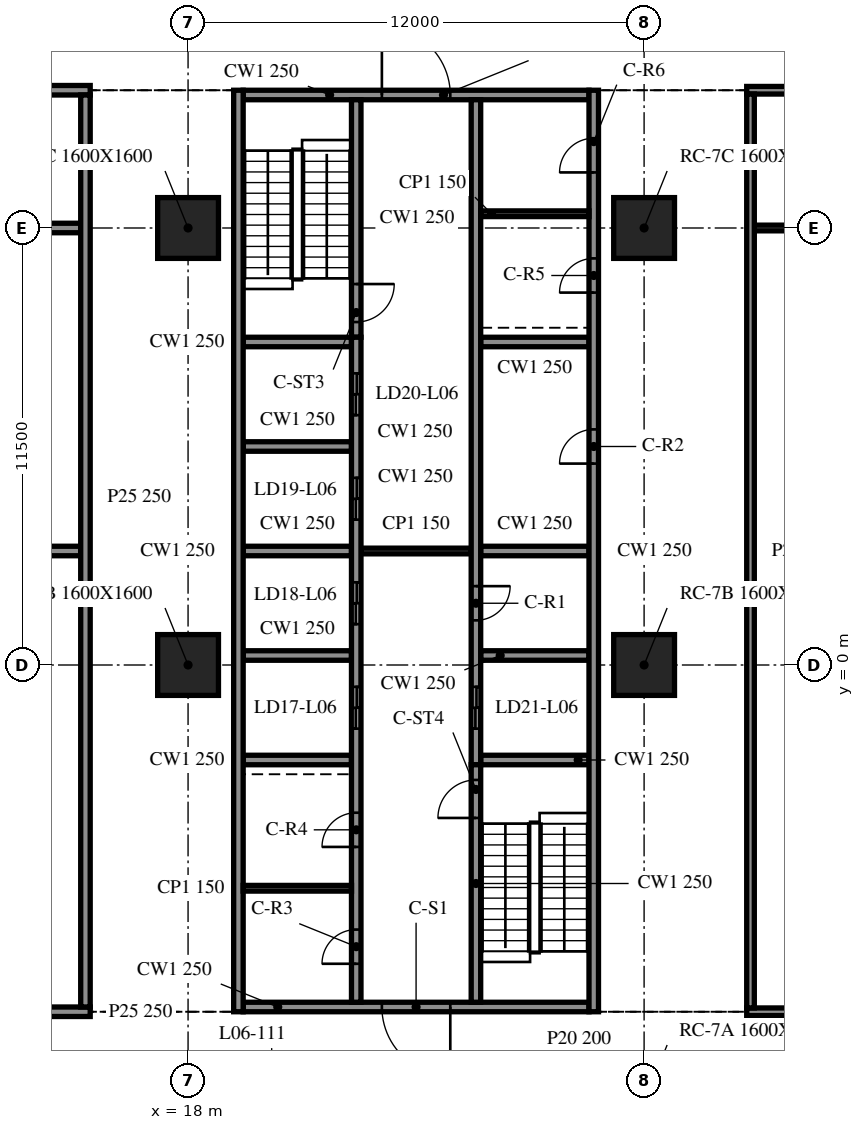
"""IFC4 building model, lengths in metres.
Left out: names, types, materials, properties, quantities, classifications, styles, units other than length and angle.
Written with IfcOpenShell. Run it as: python <this file> out.ifc"""

import sys

from ifc_helpers import new_model, si_unit, direction, frame, frame_2d, origin, origin_2d, place, context, subcontext, project, spatial, rectangle, extrude, element, fill, save


model = new_model("IFC4")
c1 = context("Model", 3, precision=1e-05, world=origin(), true_north=direction((0.0, 1.0)))
c2 = subcontext(c1, "Body", "Model", "MODEL_VIEW")
j1 = project(units=[si_unit("LENGTHUNIT", "METRE"), si_unit("PLANEANGLEUNIT", "RADIAN")], contexts=[c1])
p1 = place(None, origin())
s1 = spatial("IfcSite", under=j1, at=p1, CompositionType="ELEMENT")
p2 = place(p1, origin())
s2 = spatial("IfcBuilding", under=s1, at=p2, CompositionType="ELEMENT")
p3 = place(p2, frame((0.0, 0.0, 28.7)))
s3 = spatial("IfcBuildingStorey", under=s2, at=p3, CompositionType="ELEMENT", Elevation=28.7)
for number, where, z_axis, x_axis in (
    (1, (18.0, 0.0, -0.34), (0.0, 0.0, 1.0), (1.0, 0.0, 0.0)),
    (2, (18.0, 11.5, -0.34), (0.0, 0.0, 1.0), (1.0, 0.0, 0.0)),
    (3, (30.0, 0.0, -0.34), (0.0, 0.0, 1.0), (1.0, 0.0, 0.0)),
    (4, (30.0, 11.5, -0.34), (0.0, 0.0, 1.0), (1.0, 0.0, 0.0)),
):
    element("IfcColumn", number, at=place(p3, frame(where, z_axis=z_axis, x_axis=x_axis)), inside=s3, PredefinedType="COLUMN", context=c2, shape_type="SweptSolid", body=[
        extrude(rectangle(XDim=1.6, YDim=1.6, at=origin_2d()), origin(), (0.0, 0.0, 1.0), 4.3),
    ])
p4 = place(p3, frame((19.325, 15.125, 0.0), z_axis=(0.0, 0.0, 1.0), x_axis=(0.0, -1.0, 0.0)))
e5 = element("IfcWall", 5, at=p4, inside=s3, PredefinedType="SOLIDWALL", context=c2, shape_type="SweptSolid", body=[
    extrude(rectangle(XDim=24.25, YDim=0.25, at=frame_2d((12.125, 0.0))), origin(), (0.0, 0.0, 1.0), 3.96),
])
p5 = place(p3, frame((28.675, -9.125, 0.0), z_axis=(0.0, 0.0, 1.0), x_axis=(0.0, 1.0, 0.0)))
e6 = element("IfcWall", 6, at=p5, inside=s3, PredefinedType="SOLIDWALL", context=c2, shape_type="SweptSolid", body=[
    extrude(rectangle(XDim=24.25, YDim=0.25, at=frame_2d((12.125, 0.0))), origin(), (0.0, 0.0, 1.0), 3.96),
])
p6 = place(p5, frame((14.425, 0.0, 0.0)))
e7 = element("IfcOpeningElement", 7, at=p6, cuts=e6, PredefinedType="OPENING", context=c2, shape_type="SweptSolid", body=[
    extrude(rectangle(XDim=0.9, YDim=2.1, at=frame_2d((0.45, 1.05))), frame((0.0, 0.135, 0.0), z_axis=(0.0, -1.0, 0.0), x_axis=(1.0, 0.0, 0.0)), (0.0, 0.0, 1.0), 0.27),
])
p7 = place(p5, frame((18.925, 0.0, 0.0)))
e8 = element("IfcOpeningElement", 8, at=p7, cuts=e6, PredefinedType="OPENING", context=c2, shape_type="SweptSolid", body=[
    extrude(rectangle(XDim=0.9, YDim=2.1, at=frame_2d((0.45, 1.05))), frame((0.0, 0.135, 0.0), z_axis=(0.0, -1.0, 0.0), x_axis=(1.0, 0.0, 0.0)), (0.0, 0.0, 1.0), 0.27),
])
p8 = place(p5, frame((22.087, 0.0, 0.0)))
e9 = element("IfcOpeningElement", 9, at=p8, cuts=e6, PredefinedType="OPENING", context=c2, shape_type="SweptSolid", body=[
    extrude(rectangle(XDim=0.9, YDim=2.1, at=frame_2d((0.45, 1.05))), frame((0.0, 0.135, 0.0), z_axis=(0.0, -1.0, 0.0), x_axis=(1.0, 0.0, 0.0)), (0.0, 0.0, 1.0), 0.27),
])
p9 = place(p3, frame((28.55, -9.0, 0.0), z_axis=(0.0, 0.0, 1.0), x_axis=(-1.0, 0.0, 0.0)))
e10 = element("IfcWall", 10, at=p9, inside=s3, PredefinedType="SOLIDWALL", context=c2, shape_type="SweptSolid", body=[
    extrude(rectangle(XDim=9.1, YDim=0.25, at=frame_2d((4.55, 0.0))), origin(), (0.0, 0.0, 1.0), 3.96),
])
p10 = place(p9, frame((3.65, 0.0, 0.0)))
e11 = element("IfcOpeningElement", 11, at=p10, cuts=e10, PredefinedType="OPENING", context=c2, shape_type="SweptSolid", body=[
    extrude(rectangle(XDim=1.8, YDim=2.1, at=frame_2d((0.9, 1.05))), frame((0.0, 0.135, 0.0), z_axis=(0.0, -1.0, 0.0), x_axis=(1.0, 0.0, 0.0)), (0.0, 0.0, 1.0), 0.27),
])
p11 = place(p3, frame((19.45, 15.0, 0.0), z_axis=(0.0, 0.0, 1.0), x_axis=(1.0, 0.0, 0.0)))
e12 = element("IfcWall", 12, at=p11, inside=s3, PredefinedType="SOLIDWALL", context=c2, shape_type="SweptSolid", body=[
    extrude(rectangle(XDim=9.1, YDim=0.25, at=frame_2d((4.55, 0.0))), origin(), (0.0, 0.0, 1.0), 3.96),
])
p12 = place(p11, frame((3.65, 0.0, 0.0)))
e13 = element("IfcOpeningElement", 13, at=p12, cuts=e12, PredefinedType="OPENING", context=c2, shape_type="SweptSolid", body=[
    extrude(rectangle(XDim=1.8, YDim=2.1, at=frame_2d((0.9, 1.05))), frame((0.0, 0.135, 0.0), z_axis=(0.0, -1.0, 0.0), x_axis=(1.0, 0.0, 0.0)), (0.0, 0.0, 1.0), 0.27),
])
p13 = place(p3, frame((22.425, -8.875, 0.0), z_axis=(0.0, 0.0, 1.0), x_axis=(0.0, 1.0, 0.0)))
e14 = element("IfcWall", 14, at=p13, inside=s3, PredefinedType="SOLIDWALL", context=c2, shape_type="SweptSolid", body=[
    extrude(rectangle(XDim=17.5, YDim=0.25, at=frame_2d((8.75, 0.0))), origin(), (0.0, 0.0, 1.0), 3.96),
])
p14 = place(p13, frame((7.2, 0.0, 0.0)))
e15 = element("IfcOpeningElement", 15, at=p14, cuts=e14, PredefinedType="OPENING", context=c2, shape_type="SweptSolid", body=[
    extrude(rectangle(XDim=1.1, YDim=2.1, at=frame_2d((0.55, 1.05))), frame((0.0, 0.135, 0.0), z_axis=(0.0, -1.0, 0.0), x_axis=(1.0, 0.0, 0.0)), (0.0, 0.0, 1.0), 0.27),
])
p15 = place(p13, frame((9.95, 0.0, 0.0)))
e16 = element("IfcOpeningElement", 16, at=p15, cuts=e14, PredefinedType="OPENING", context=c2, shape_type="SweptSolid", body=[
    extrude(rectangle(XDim=1.1, YDim=2.1, at=frame_2d((0.55, 1.05))), frame((0.0, 0.135, 0.0), z_axis=(0.0, -1.0, 0.0), x_axis=(1.0, 0.0, 0.0)), (0.0, 0.0, 1.0), 0.27),
])
p16 = place(p13, frame((12.7, 0.0, 0.0)))
e17 = element("IfcOpeningElement", 17, at=p16, cuts=e14, PredefinedType="OPENING", context=c2, shape_type="SweptSolid", body=[
    extrude(rectangle(XDim=1.1, YDim=2.1, at=frame_2d((0.55, 1.05))), frame((0.0, 0.135, 0.0), z_axis=(0.0, -1.0, 0.0), x_axis=(1.0, 0.0, 0.0)), (0.0, 0.0, 1.0), 0.27),
])
p17 = place(p13, frame((15.45, 0.0, 0.0)))
e18 = element("IfcOpeningElement", 18, at=p17, cuts=e14, PredefinedType="OPENING", context=c2, shape_type="SweptSolid", body=[
    extrude(rectangle(XDim=1.1, YDim=2.1, at=frame_2d((0.55, 1.05))), frame((0.0, 0.135, 0.0), z_axis=(0.0, -1.0, 0.0), x_axis=(1.0, 0.0, 0.0)), (0.0, 0.0, 1.0), 0.27),
])
p18 = place(p13, frame((1.012, 0.0, 0.0)))
e19 = element("IfcOpeningElement", 19, at=p18, cuts=e14, PredefinedType="OPENING", context=c2, shape_type="SweptSolid", body=[
    extrude(rectangle(XDim=0.9, YDim=2.1, at=frame_2d((0.45, 1.05))), frame((0.0, 0.135, 0.0), z_axis=(0.0, -1.0, 0.0), x_axis=(1.0, 0.0, 0.0)), (0.0, 0.0, 1.0), 0.27),
])
p19 = place(p13, frame((4.087, 0.0, 0.0)))
e20 = element("IfcOpeningElement", 20, at=p19, cuts=e14, PredefinedType="OPENING", context=c2, shape_type="SweptSolid", body=[
    extrude(rectangle(XDim=0.9, YDim=2.1, at=frame_2d((0.45, 1.05))), frame((0.0, 0.135, 0.0), z_axis=(0.0, -1.0, 0.0), x_axis=(1.0, 0.0, 0.0)), (0.0, 0.0, 1.0), 0.27),
])
p20 = place(p3, frame((22.425, 14.875, 0.0), z_axis=(0.0, 0.0, 1.0), x_axis=(0.0, -1.0, 0.0)))
e21 = element("IfcWall", 21, at=p20, inside=s3, PredefinedType="SOLIDWALL", context=c2, shape_type="SweptSolid", body=[
    extrude(rectangle(XDim=6.25, YDim=0.25, at=frame_2d((3.125, 0.0))), origin(), (0.0, 0.0, 1.0), 3.96),
])
p21 = place(p20, frame((4.85, 0.0, 0.0)))
e22 = element("IfcOpeningElement", 22, at=p21, cuts=e21, PredefinedType="OPENING", context=c2, shape_type="SweptSolid", body=[
    extrude(rectangle(XDim=1.0, YDim=2.1, at=frame_2d((0.5, 1.05))), frame((0.0, 0.135, 0.0), z_axis=(0.0, -1.0, 0.0), x_axis=(1.0, 0.0, 0.0)), (0.0, 0.0, 1.0), 0.27),
])
p22 = place(p3, frame((25.575, -8.875, 0.0), z_axis=(0.0, 0.0, 1.0), x_axis=(0.0, 1.0, 0.0)))
e23 = element("IfcWall", 23, at=p22, inside=s3, PredefinedType="SOLIDWALL", context=c2, shape_type="SweptSolid", body=[
    extrude(rectangle(XDim=6.25, YDim=0.25, at=frame_2d((3.125, 0.0))), origin(), (0.0, 0.0, 1.0), 3.96),
])
p23 = place(p22, frame((4.85, 0.0, 0.0)))
e24 = element("IfcOpeningElement", 24, at=p23, cuts=e23, PredefinedType="OPENING", context=c2, shape_type="SweptSolid", body=[
    extrude(rectangle(XDim=1.0, YDim=2.1, at=frame_2d((0.5, 1.05))), frame((0.0, 0.135, 0.0), z_axis=(0.0, -1.0, 0.0), x_axis=(1.0, 0.0, 0.0)), (0.0, 0.0, 1.0), 0.27),
])
p24 = place(p3, frame((25.575, 14.875, 0.0), z_axis=(0.0, 0.0, 1.0), x_axis=(0.0, -1.0, 0.0)))
e25 = element("IfcWall", 25, at=p24, inside=s3, PredefinedType="SOLIDWALL", context=c2, shape_type="SweptSolid", body=[
    extrude(rectangle(XDim=17.5, YDim=0.25, at=frame_2d((8.75, 0.0))), origin(), (0.0, 0.0, 1.0), 3.96),
])
p25 = place(p24, frame((15.45, 0.0, 0.0)))
e26 = element("IfcOpeningElement", 26, at=p25, cuts=e25, PredefinedType="OPENING", context=c2, shape_type="SweptSolid", body=[
    extrude(rectangle(XDim=1.1, YDim=2.1, at=frame_2d((0.55, 1.05))), frame((0.0, 0.135, 0.0), z_axis=(0.0, -1.0, 0.0), x_axis=(1.0, 0.0, 0.0)), (0.0, 0.0, 1.0), 0.27),
])
p26 = place(p24, frame((12.8, 0.0, 0.0)))
e27 = element("IfcOpeningElement", 27, at=p26, cuts=e25, PredefinedType="OPENING", context=c2, shape_type="SweptSolid", body=[
    extrude(rectangle(XDim=0.9, YDim=2.1, at=frame_2d((0.45, 1.05))), frame((0.0, 0.135, 0.0), z_axis=(0.0, -1.0, 0.0), x_axis=(1.0, 0.0, 0.0)), (0.0, 0.0, 1.0), 0.27),
])
for number, where, z_axis, x_axis in (
    (28, (19.45, -2.5, 0.0), (0.0, 0.0, 1.0), (1.0, 0.0, 0.0)),
    (29, (19.45, 0.25, 0.0), (0.0, 0.0, 1.0), (1.0, 0.0, 0.0)),
    (30, (19.45, 3.0, 0.0), (0.0, 0.0, 1.0), (1.0, 0.0, 0.0)),
    (31, (19.45, 5.75, 0.0), (0.0, 0.0, 1.0), (1.0, 0.0, 0.0)),
    (32, (19.45, 8.5, 0.0), (0.0, 0.0, 1.0), (1.0, 0.0, 0.0)),
    (33, (25.7, -2.5, 0.0), (0.0, 0.0, 1.0), (1.0, 0.0, 0.0)),
    (34, (25.7, 0.25, 0.0), (0.0, 0.0, 1.0), (1.0, 0.0, 0.0)),
    (35, (25.7, 3.0, 0.0), (0.0, 0.0, 1.0), (1.0, 0.0, 0.0)),
    (36, (25.7, 8.5, 0.0), (0.0, 0.0, 1.0), (1.0, 0.0, 0.0)),
):
    element("IfcWall", number, at=place(p3, frame(where, z_axis=z_axis, x_axis=x_axis)), inside=s3, PredefinedType="SOLIDWALL", context=c2, shape_type="SweptSolid", body=[
        extrude(rectangle(XDim=2.85, YDim=0.25, at=frame_2d((1.425, 0.0))), origin(), (0.0, 0.0, 1.0), 3.96),
    ])
p27 = place(p3, frame((22.55, 3.0, 0.0), z_axis=(0.0, 0.0, 1.0), x_axis=(1.0, 0.0, 0.0)))
e37 = element("IfcWall", 37, at=p27, inside=s3, PredefinedType="PARTITIONING", context=c2, shape_type="SweptSolid", body=[
    extrude(rectangle(XDim=2.9, YDim=0.15, at=frame_2d((1.45, 0.0))), origin(), (0.0, 0.0, 1.0), 3.96),
])
for number, where, z_axis, x_axis in (
    (38, (19.45, -5.875, 0.0), (0.0, 0.0, 1.0), (1.0, 0.0, 0.0)),
    (39, (25.7, 11.875, 0.0), (0.0, 0.0, 1.0), (1.0, 0.0, 0.0)),
):
    element("IfcWall", number, at=place(p3, frame(where, z_axis=z_axis, x_axis=x_axis)), inside=s3, PredefinedType="PARTITIONING", context=c2, shape_type="SweptSolid", body=[
        extrude(rectangle(XDim=2.85, YDim=0.15, at=frame_2d((1.425, 0.0))), origin(), (0.0, 0.0, 1.0), 3.96),
    ])
p28 = place(p3, frame((8.475, -9.125, 0.0), z_axis=(0.0, 0.0, 1.0), x_axis=(1.0, 0.0, 0.0)))
e40 = element("IfcWall", 40, at=p28, inside=s3, PredefinedType="PARTITIONING", context=c2, shape_type="SweptSolid", body=[
    extrude(rectangle(XDim=6.95, YDim=0.25, at=frame_2d((3.475, 0.0))), origin(), (0.0, 0.0, 1.0), 3.96),
])
p29 = place(p28, frame((3.1, 0.0, 0.0)))
e41 = element("IfcOpeningElement", 41, at=p29, cuts=e40, PredefinedType="OPENING", context=c2, shape_type="SweptSolid", body=[
    extrude(rectangle(XDim=0.9, YDim=2.1, at=frame_2d((0.45, 1.05))), frame((0.0, 0.135, 0.0), z_axis=(0.0, -1.0, 0.0), x_axis=(1.0, 0.0, 0.0)), (0.0, 0.0, 1.0), 0.27),
])
p30 = place(p3, frame((32.7, -9.125, 0.0), z_axis=(0.0, 0.0, 1.0), x_axis=(1.0, 0.0, 0.0)))
e42 = element("IfcWall", 42, at=p30, inside=s3, PredefinedType="PARTITIONING", context=c2, shape_type="SweptSolid", body=[
    extrude(rectangle(XDim=15.15, YDim=0.2, at=frame_2d((7.575, 0.0))), origin(), (0.0, 0.0, 1.0), 3.96),
])
p31 = place(p30, frame((6.9, 0.0, 0.0)))
e43 = element("IfcOpeningElement", 43, at=p31, cuts=e42, PredefinedType="OPENING", context=c2, shape_type="SweptSolid", body=[
    extrude(rectangle(XDim=1.2, YDim=2.1, at=frame_2d((0.6, 1.05))), frame((0.0, 0.11, 0.0), z_axis=(0.0, -1.0, 0.0), x_axis=(1.0, 0.0, 0.0)), (0.0, 0.0, 1.0), 0.22),
])
for number, where, z_axis, x_axis in (
    (44, (8.725, 3.0, 0.0), (0.0, 0.0, 1.0), (1.0, 0.0, 0.0)),
    (45, (8.725, 11.5, 0.0), (0.0, 0.0, 1.0), (1.0, 0.0, 0.0)),
):
    element("IfcWall", number, at=place(p3, frame(where, z_axis=z_axis, x_axis=x_axis)), inside=s3, PredefinedType="PARTITIONING", context=c2, shape_type="SweptSolid", body=[
        extrude(rectangle(XDim=6.45, YDim=0.25, at=frame_2d((3.225, 0.0))), origin(), (0.0, 0.0, 1.0), 3.96),
    ])
p32 = place(p3, frame((32.9, 11.5, 0.0), z_axis=(0.0, 0.0, 1.0), x_axis=(1.0, 0.0, 0.0)))
e46 = element("IfcWall", 46, at=p32, inside=s3, PredefinedType="PARTITIONING", context=c2, shape_type="SweptSolid", body=[
    extrude(rectangle(XDim=8.3, YDim=0.15, at=frame_2d((4.15, 0.0))), origin(), (0.0, 0.0, 1.0), 3.96),
])
p33 = place(p3, frame((8.475, 15.125, 0.0), z_axis=(0.0, 0.0, 1.0), x_axis=(1.0, 0.0, 0.0)))
e47 = element("IfcWall", 47, at=p33, inside=s3, PredefinedType="PARTITIONING", context=c2, shape_type="SweptSolid", body=[
    extrude(rectangle(XDim=6.95, YDim=0.25, at=frame_2d((3.475, 0.0))), origin(), (0.0, 0.0, 1.0), 3.96),
])
p34 = place(p33, frame((3.1, 0.0, 0.0)))
e48 = element("IfcOpeningElement", 48, at=p34, cuts=e47, PredefinedType="OPENING", context=c2, shape_type="SweptSolid", body=[
    extrude(rectangle(XDim=0.9, YDim=2.1, at=frame_2d((0.45, 1.05))), frame((0.0, 0.135, 0.0), z_axis=(0.0, -1.0, 0.0), x_axis=(1.0, 0.0, 0.0)), (0.0, 0.0, 1.0), 0.27),
])
p35 = place(p3, frame((32.7, 15.125, 0.0), z_axis=(0.0, 0.0, 1.0), x_axis=(1.0, 0.0, 0.0)))
e49 = element("IfcWall", 49, at=p35, inside=s3, PredefinedType="PARTITIONING", context=c2, shape_type="SweptSolid", body=[
    extrude(rectangle(XDim=15.15, YDim=0.2, at=frame_2d((7.575, 0.0))), origin(), (0.0, 0.0, 1.0), 3.96),
])
p36 = place(p35, frame((7.1, 0.0, 0.0)))
e50 = element("IfcOpeningElement", 50, at=p36, cuts=e49, PredefinedType="OPENING", context=c2, shape_type="SweptSolid", body=[
    extrude(rectangle(XDim=1.0, YDim=2.1, at=frame_2d((0.5, 1.05))), frame((0.0, 0.11, 0.0), z_axis=(0.0, -1.0, 0.0), x_axis=(1.0, 0.0, 0.0)), (0.0, 0.0, 1.0), 0.22),
])
p37 = place(p3, frame((15.3, -9.0, 0.0), z_axis=(0.0, 0.0, 1.0), x_axis=(0.0, 1.0, 0.0)))
e51 = element("IfcWall", 51, at=p37, inside=s3, PredefinedType="PARTITIONING", context=c2, shape_type="SweptSolid", body=[
    extrude(rectangle(XDim=24.0, YDim=0.25, at=frame_2d((12.0, 0.0))), origin(), (0.0, 0.0, 1.0), 3.96),
])
p38 = place(p3, frame((32.8, -9.025, 0.0), z_axis=(0.0, 0.0, 1.0), x_axis=(0.0, 1.0, 0.0)))
e52 = element("IfcWall", 52, at=p38, inside=s3, PredefinedType="PARTITIONING", context=c2, shape_type="SweptSolid", body=[
    extrude(rectangle(XDim=24.05, YDim=0.2, at=frame_2d((12.025, 0.0))), origin(), (0.0, 0.0, 1.0), 3.96),
])
p39 = place(p10, origin())
e53 = element("IfcDoor", 53, at=p39, inside=s3, OperationType="DOUBLE_DOOR_SINGLE_SWING", PredefinedType="DOOR", context=c2, shape_type="SweptSolid", body=[
    extrude(rectangle(XDim=1.8, YDim=2.1, at=frame_2d((0.9, 1.05))), frame((0.0, 0.025, 0.0), z_axis=(0.0, -1.0, 0.0), x_axis=(1.0, 0.0, 0.0)), (0.0, 0.0, 1.0), 0.05),
])
fill(e11, e53)
p40 = place(p12, origin())
e54 = element("IfcDoor", 54, at=p40, inside=s3, OperationType="DOUBLE_DOOR_SINGLE_SWING", PredefinedType="DOOR", context=c2, shape_type="SweptSolid", body=[
    extrude(rectangle(XDim=1.8, YDim=2.1, at=frame_2d((0.9, 1.05))), frame((0.0, 0.025, 0.0), z_axis=(0.0, -1.0, 0.0), x_axis=(1.0, 0.0, 0.0)), (0.0, 0.0, 1.0), 0.05),
])
fill(e13, e54)
p41 = place(p25, origin())
e55 = element("IfcDoor", 55, at=p41, inside=s3, OperationType="DOUBLE_DOOR_SLIDING", PredefinedType="DOOR", context=c2, shape_type="SweptSolid", body=[
    extrude(rectangle(XDim=1.1, YDim=2.1, at=frame_2d((0.55, 1.05))), frame((0.0, 0.025, 0.0), z_axis=(0.0, -1.0, 0.0), x_axis=(1.0, 0.0, 0.0)), (0.0, 0.0, 1.0), 0.05),
])
fill(e26, e55)
p42 = place(p14, origin())
e56 = element("IfcDoor", 56, at=p42, inside=s3, OperationType="DOUBLE_DOOR_SLIDING", PredefinedType="DOOR", context=c2, shape_type="SweptSolid", body=[
    extrude(rectangle(XDim=1.1, YDim=2.1, at=frame_2d((0.55, 1.05))), frame((0.0, 0.025, 0.0), z_axis=(0.0, -1.0, 0.0), x_axis=(1.0, 0.0, 0.0)), (0.0, 0.0, 1.0), 0.05),
])
fill(e15, e56)
p43 = place(p15, origin())
e57 = element("IfcDoor", 57, at=p43, inside=s3, OperationType="DOUBLE_DOOR_SLIDING", PredefinedType="DOOR", context=c2, shape_type="SweptSolid", body=[
    extrude(rectangle(XDim=1.1, YDim=2.1, at=frame_2d((0.55, 1.05))), frame((0.0, 0.025, 0.0), z_axis=(0.0, -1.0, 0.0), x_axis=(1.0, 0.0, 0.0)), (0.0, 0.0, 1.0), 0.05),
])
fill(e16, e57)
p44 = place(p16, origin())
e58 = element("IfcDoor", 58, at=p44, inside=s3, OperationType="DOUBLE_DOOR_SLIDING", PredefinedType="DOOR", context=c2, shape_type="SweptSolid", body=[
    extrude(rectangle(XDim=1.1, YDim=2.1, at=frame_2d((0.55, 1.05))), frame((0.0, 0.025, 0.0), z_axis=(0.0, -1.0, 0.0), x_axis=(1.0, 0.0, 0.0)), (0.0, 0.0, 1.0), 0.05),
])
fill(e17, e58)
p45 = place(p17, origin())
e59 = element("IfcDoor", 59, at=p45, inside=s3, OperationType="DOUBLE_DOOR_SLIDING", PredefinedType="DOOR", context=c2, shape_type="SweptSolid", body=[
    extrude(rectangle(XDim=1.1, YDim=2.1, at=frame_2d((0.55, 1.05))), frame((0.0, 0.025, 0.0), z_axis=(0.0, -1.0, 0.0), x_axis=(1.0, 0.0, 0.0)), (0.0, 0.0, 1.0), 0.05),
])
fill(e18, e59)
p46 = place(p26, origin())
e60 = element("IfcDoor", 60, at=p46, inside=s3, OperationType="SINGLE_SWING_LEFT", PredefinedType="DOOR", context=c2, shape_type="SweptSolid", body=[
    extrude(rectangle(XDim=0.9, YDim=2.1, at=frame_2d((0.45, 1.05))), frame((0.0, 0.025, 0.0), z_axis=(0.0, -1.0, 0.0), x_axis=(1.0, 0.0, 0.0)), (0.0, 0.0, 1.0), 0.05),
])
fill(e27, e60)
p47 = place(p6, origin())
e61 = element("IfcDoor", 61, at=p47, inside=s3, OperationType="SINGLE_SWING_RIGHT", PredefinedType="DOOR", context=c2, shape_type="SweptSolid", body=[
    extrude(rectangle(XDim=0.9, YDim=2.1, at=frame_2d((0.45, 1.05))), frame((0.0, 0.025, 0.0), z_axis=(0.0, -1.0, 0.0), x_axis=(1.0, 0.0, 0.0)), (0.0, 0.0, 1.0), 0.05),
])
fill(e7, e61)
p48 = place(p18, origin())
e62 = element("IfcDoor", 62, at=p48, inside=s3, OperationType="SINGLE_SWING_LEFT", PredefinedType="DOOR", context=c2, shape_type="SweptSolid", body=[
    extrude(rectangle(XDim=0.9, YDim=2.1, at=frame_2d((0.45, 1.05))), frame((0.0, 0.025, 0.0), z_axis=(0.0, -1.0, 0.0), x_axis=(1.0, 0.0, 0.0)), (0.0, 0.0, 1.0), 0.05),
])
fill(e19, e62)
p49 = place(p19, origin())
e63 = element("IfcDoor", 63, at=p49, inside=s3, OperationType="SINGLE_SWING_RIGHT", PredefinedType="DOOR", context=c2, shape_type="SweptSolid", body=[
    extrude(rectangle(XDim=0.9, YDim=2.1, at=frame_2d((0.45, 1.05))), frame((0.0, 0.025, 0.0), z_axis=(0.0, -1.0, 0.0), x_axis=(1.0, 0.0, 0.0)), (0.0, 0.0, 1.0), 0.05),
])
fill(e20, e63)
p50 = place(p7, origin())
e64 = element("IfcDoor", 64, at=p50, inside=s3, OperationType="SINGLE_SWING_LEFT", PredefinedType="DOOR", context=c2, shape_type="SweptSolid", body=[
    extrude(rectangle(XDim=0.9, YDim=2.1, at=frame_2d((0.45, 1.05))), frame((0.0, 0.025, 0.0), z_axis=(0.0, -1.0, 0.0), x_axis=(1.0, 0.0, 0.0)), (0.0, 0.0, 1.0), 0.05),
])
fill(e8, e64)
p51 = place(p8, origin())
e65 = element("IfcDoor", 65, at=p51, inside=s3, OperationType="SINGLE_SWING_RIGHT", PredefinedType="DOOR", context=c2, shape_type="SweptSolid", body=[
    extrude(rectangle(XDim=0.9, YDim=2.1, at=frame_2d((0.45, 1.05))), frame((0.0, 0.025, 0.0), z_axis=(0.0, -1.0, 0.0), x_axis=(1.0, 0.0, 0.0)), (0.0, 0.0, 1.0), 0.05),
])
fill(e9, e65)
p52 = place(p21, origin())
e66 = element("IfcDoor", 66, at=p52, inside=s3, OperationType="SINGLE_SWING_LEFT", PredefinedType="DOOR", context=c2, shape_type="SweptSolid", body=[
    extrude(rectangle(XDim=1.0, YDim=2.1, at=frame_2d((0.5, 1.05))), frame((0.0, 0.025, 0.0), z_axis=(0.0, -1.0, 0.0), x_axis=(1.0, 0.0, 0.0)), (0.0, 0.0, 1.0), 0.05),
])
fill(e22, e66)
p53 = place(p23, origin())
e67 = element("IfcDoor", 67, at=p53, inside=s3, OperationType="SINGLE_SWING_RIGHT", PredefinedType="DOOR", context=c2, shape_type="SweptSolid", body=[
    extrude(rectangle(XDim=1.0, YDim=2.1, at=frame_2d((0.5, 1.05))), frame((0.0, 0.025, 0.0), z_axis=(0.0, -1.0, 0.0), x_axis=(1.0, 0.0, 0.0)), (0.0, 0.0, 1.0), 0.05),
])
fill(e24, e67)
save(model, sys.argv[1])
